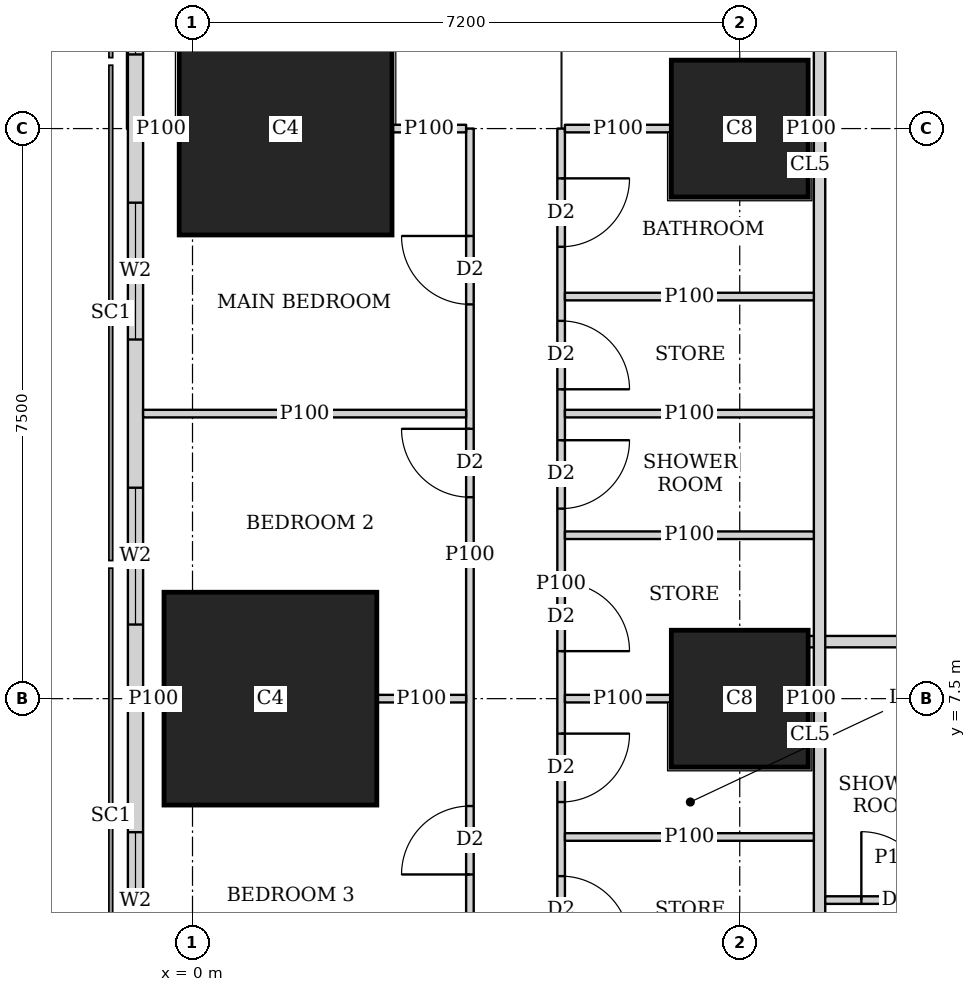
"""IFC4 building model, lengths in metres.
Left out: names, types, materials, properties, quantities, classifications, styles, units other than length and angle.
Written with IfcOpenShell. Run it as: python <this file> out.ifc"""

import sys

from ifc_helpers import new_model, si_unit, direction, frame, frame_2d, origin, origin_2d, place, context, subcontext, project, spatial, rectangle, extrude, element, fill, save


model = new_model("IFC4")
c1 = context("Model", 3, precision=1e-05, world=origin(), true_north=direction((0.0, 1.0)))
c2 = subcontext(c1, "Body", "Model", "MODEL_VIEW")
j1 = project(units=[si_unit("LENGTHUNIT", "METRE"), si_unit("PLANEANGLEUNIT", "RADIAN")], contexts=[c1])
p1 = place(None, origin())
s1 = spatial("IfcSite", under=j1, at=p1, CompositionType="ELEMENT")
p2 = place(p1, origin())
s2 = spatial("IfcBuilding", under=s1, at=p2, CompositionType="ELEMENT")
p3 = place(p2, frame((0.0, 0.0, 31.25)))
s3 = spatial("IfcBuildingStorey", under=s2, at=p3, CompositionType="ELEMENT", Elevation=31.25)
p4 = place(p3, frame((1.025, 7.5, 0.0), z_axis=(0.0, 0.0, 1.0), x_axis=(1.0, 0.0, 0.0)))
e1 = element("IfcColumn", 1, at=p4, inside=s3, PredefinedType="COLUMN", context=c2, shape_type="SweptSolid", body=[
    extrude(rectangle(XDim=2.8, YDim=2.8, at=origin_2d()), origin(), (0.0, 0.0, 1.0), 3.75),
])
p5 = place(p3, frame((7.2, 7.5, 0.0), z_axis=(0.0, 0.0, 1.0), x_axis=(1.0, 0.0, 0.0)))
e2 = element("IfcColumn", 2, at=p5, inside=s3, PredefinedType="COLUMN", context=c2, shape_type="SweptSolid", body=[
    extrude(rectangle(XDim=1.8, YDim=1.8, at=origin_2d()), origin(), (0.0, 0.0, 1.0), 3.75),
])
p6 = place(p3, frame((1.225, 15.0, 0.0), z_axis=(0.0, 0.0, 1.0), x_axis=(1.0, 0.0, 0.0)))
e3 = element("IfcColumn", 3, at=p6, inside=s3, PredefinedType="COLUMN", context=c2, shape_type="SweptSolid", body=[
    extrude(rectangle(XDim=2.8, YDim=2.8, at=origin_2d()), origin(), (0.0, 0.0, 1.0), 3.75),
])
p7 = place(p3, frame((7.2, 15.0, 0.0), z_axis=(0.0, 0.0, 1.0), x_axis=(1.0, 0.0, 0.0)))
e4 = element("IfcColumn", 4, at=p7, inside=s3, PredefinedType="COLUMN", context=c2, shape_type="SweptSolid", body=[
    extrude(rectangle(XDim=1.8, YDim=1.8, at=origin_2d()), origin(), (0.0, 0.0, 1.0), 3.75),
])
p8 = place(p3, frame((-0.75, 42.837, 0.0), z_axis=(0.0, 0.0, 1.0), x_axis=(0.0, -1.0, 0.0)))
e5 = element("IfcWall", 5, at=p8, inside=s3, PredefinedType="SOLIDWALL", context=c2, shape_type="SweptSolid", body=[
    extrude(rectangle(XDim=40.674, YDim=0.2, at=frame_2d((20.337, 0.0))), origin(), (0.0, 0.0, 1.0), 3.5),
])
p9 = place(p8, frame((1.78, 0.0, 0.9)))
e6 = element("IfcOpeningElement", 6, at=p9, cuts=e5, PredefinedType="OPENING", context=c2, shape_type="SweptSolid", body=[
    extrude(rectangle(XDim=1.8, YDim=1.5, at=frame_2d((0.9, 0.75))), frame((0.0, 0.11, 0.0), z_axis=(0.0, -1.0, 0.0), x_axis=(1.0, 0.0, 0.0)), (0.0, 0.0, 1.0), 0.22),
])
p10 = place(p8, frame((6.312, 0.0, 0.9)))
e7 = element("IfcOpeningElement", 7, at=p10, cuts=e5, PredefinedType="OPENING", context=c2, shape_type="SweptSolid", body=[
    extrude(rectangle(XDim=1.8, YDim=1.5, at=frame_2d((0.9, 0.75))), frame((0.0, 0.11, 0.0), z_axis=(0.0, -1.0, 0.0), x_axis=(1.0, 0.0, 0.0)), (0.0, 0.0, 1.0), 0.22),
])
p11 = place(p8, frame((10.062, 0.0, 0.9)))
e8 = element("IfcOpeningElement", 8, at=p11, cuts=e5, PredefinedType="OPENING", context=c2, shape_type="SweptSolid", body=[
    extrude(rectangle(XDim=1.8, YDim=1.5, at=frame_2d((0.9, 0.75))), frame((0.0, 0.11, 0.0), z_axis=(0.0, -1.0, 0.0), x_axis=(1.0, 0.0, 0.0)), (0.0, 0.0, 1.0), 0.22),
])
p12 = place(p8, frame((13.812, 0.0, 0.9)))
e9 = element("IfcOpeningElement", 9, at=p12, cuts=e5, PredefinedType="OPENING", context=c2, shape_type="SweptSolid", body=[
    extrude(rectangle(XDim=1.8, YDim=1.5, at=frame_2d((0.9, 0.75))), frame((0.0, 0.11, 0.0), z_axis=(0.0, -1.0, 0.0), x_axis=(1.0, 0.0, 0.0)), (0.0, 0.0, 1.0), 0.22),
])
p13 = place(p8, frame((17.562, 0.0, 0.9)))
e10 = element("IfcOpeningElement", 10, at=p13, cuts=e5, PredefinedType="OPENING", context=c2, shape_type="SweptSolid", body=[
    extrude(rectangle(XDim=1.8, YDim=1.5, at=frame_2d((0.9, 0.75))), frame((0.0, 0.11, 0.0), z_axis=(0.0, -1.0, 0.0), x_axis=(1.0, 0.0, 0.0)), (0.0, 0.0, 1.0), 0.22),
])
p14 = place(p8, frame((21.312, 0.0, 0.9)))
e11 = element("IfcOpeningElement", 11, at=p14, cuts=e5, PredefinedType="OPENING", context=c2, shape_type="SweptSolid", body=[
    extrude(rectangle(XDim=1.8, YDim=1.5, at=frame_2d((0.9, 0.75))), frame((0.0, 0.11, 0.0), z_axis=(0.0, -1.0, 0.0), x_axis=(1.0, 0.0, 0.0)), (0.0, 0.0, 1.0), 0.22),
])
p15 = place(p8, frame((25.062, 0.0, 0.9)))
e12 = element("IfcOpeningElement", 12, at=p15, cuts=e5, PredefinedType="OPENING", context=c2, shape_type="SweptSolid", body=[
    extrude(rectangle(XDim=1.8, YDim=1.5, at=frame_2d((0.9, 0.75))), frame((0.0, 0.11, 0.0), z_axis=(0.0, -1.0, 0.0), x_axis=(1.0, 0.0, 0.0)), (0.0, 0.0, 1.0), 0.22),
])
p16 = place(p8, frame((28.812, 0.0, 0.9)))
e13 = element("IfcOpeningElement", 13, at=p16, cuts=e5, PredefinedType="OPENING", context=c2, shape_type="SweptSolid", body=[
    extrude(rectangle(XDim=1.8, YDim=1.5, at=frame_2d((0.9, 0.75))), frame((0.0, 0.11, 0.0), z_axis=(0.0, -1.0, 0.0), x_axis=(1.0, 0.0, 0.0)), (0.0, 0.0, 1.0), 0.22),
])
p17 = place(p8, frame((32.562, 0.0, 0.9)))
e14 = element("IfcOpeningElement", 14, at=p17, cuts=e5, PredefinedType="OPENING", context=c2, shape_type="SweptSolid", body=[
    extrude(rectangle(XDim=1.8, YDim=1.5, at=frame_2d((0.9, 0.75))), frame((0.0, 0.11, 0.0), z_axis=(0.0, -1.0, 0.0), x_axis=(1.0, 0.0, 0.0)), (0.0, 0.0, 1.0), 0.22),
])
p18 = place(p8, frame((37.094, 0.0, 0.9)))
e15 = element("IfcOpeningElement", 15, at=p18, cuts=e5, PredefinedType="OPENING", context=c2, shape_type="SweptSolid", body=[
    extrude(rectangle(XDim=1.8, YDim=1.5, at=frame_2d((0.9, 0.75))), frame((0.0, 0.11, 0.0), z_axis=(0.0, -1.0, 0.0), x_axis=(1.0, 0.0, 0.0)), (0.0, 0.0, 1.0), 0.22),
])
p19 = place(p3, frame((8.25, 2.426, 0.0), z_axis=(0.0, 0.0, 1.0), x_axis=(0.0, 1.0, 0.0)))
e16 = element("IfcWall", 16, at=p19, inside=s3, PredefinedType="SOLIDWALL", context=c2, shape_type="SweptSolid", body=[
    extrude(rectangle(XDim=40.173, YDim=0.15, at=frame_2d((20.086, 0.0))), origin(), (0.0, 0.0, 1.0), 3.5),
])
p20 = place(p19, frame((14.161, 0.0, 0.0)))
e17 = element("IfcOpeningElement", 17, at=p20, cuts=e16, PredefinedType="OPENING", context=c2, shape_type="SweptSolid", body=[
    extrude(rectangle(XDim=1.0, YDim=2.1, at=frame_2d((0.5, 1.05))), frame((0.0, 0.085, 0.0), z_axis=(0.0, -1.0, 0.0), x_axis=(1.0, 0.0, 0.0)), (0.0, 0.0, 1.0), 0.17),
])
p21 = place(p19, frame((17.487, 0.0, 0.0)))
e18 = element("IfcOpeningElement", 18, at=p21, cuts=e16, PredefinedType="OPENING", context=c2, shape_type="SweptSolid", body=[
    extrude(rectangle(XDim=1.0, YDim=2.1, at=frame_2d((0.5, 1.05))), frame((0.0, 0.085, 0.0), z_axis=(0.0, -1.0, 0.0), x_axis=(1.0, 0.0, 0.0)), (0.0, 0.0, 1.0), 0.17),
])
p22 = place(p19, frame((29.161, 0.0, 0.0)))
e19 = element("IfcOpeningElement", 19, at=p22, cuts=e16, PredefinedType="OPENING", context=c2, shape_type="SweptSolid", body=[
    extrude(rectangle(XDim=1.0, YDim=2.1, at=frame_2d((0.5, 1.05))), frame((0.0, 0.085, 0.0), z_axis=(0.0, -1.0, 0.0), x_axis=(1.0, 0.0, 0.0)), (0.0, 0.0, 1.0), 0.17),
])
p23 = place(p3, frame((13.499, 8.25, 0.0), z_axis=(0.0, 0.0, 1.0), x_axis=(-1.0, 0.0, 0.0)))
e20 = element("IfcWall", 20, at=p23, inside=s3, PredefinedType="SOLIDWALL", context=c2, shape_type="SweptSolid", body=[
    extrude(rectangle(XDim=5.399, YDim=0.15, at=frame_2d((2.699, 0.0))), origin(), (0.0, 0.0, 1.0), 3.5),
])
p24 = place(p23, frame((0.66, 0.0, 0.0)))
e21 = element("IfcOpeningElement", 21, at=p24, cuts=e20, PredefinedType="OPENING", context=c2, shape_type="SweptSolid", body=[
    extrude(rectangle(XDim=1.0, YDim=2.1, at=frame_2d((0.5, 1.05))), frame((0.0, 0.085, 0.0), z_axis=(0.0, -1.0, 0.0), x_axis=(1.0, 0.0, 0.0)), (0.0, 0.0, 1.0), 0.17),
])
p25 = place(p3, frame((3.65, 3.787, 0.0), z_axis=(0.0, 0.0, 1.0), x_axis=(0.0, 1.0, 0.0)))
e22 = element("IfcWall", 22, at=p25, inside=s3, PredefinedType="PARTITIONING", context=c2, shape_type="SweptSolid", body=[
    extrude(rectangle(XDim=11.213, YDim=0.1, at=frame_2d((5.606, 0.0))), origin(), (0.0, 0.0, 1.0), 3.5),
])
p26 = place(p25, frame((8.9, 0.0, 0.0)))
e23 = element("IfcOpeningElement", 23, at=p26, cuts=e22, PredefinedType="OPENING", context=c2, shape_type="SweptSolid", body=[
    extrude(rectangle(XDim=0.9, YDim=2.1, at=frame_2d((0.45, 1.05))), frame((0.0, 0.06, 0.0), z_axis=(0.0, -1.0, 0.0), x_axis=(1.0, 0.0, 0.0)), (0.0, 0.0, 1.0), 0.12),
])
p27 = place(p25, frame((6.363, 0.0, 0.0)))
e24 = element("IfcOpeningElement", 24, at=p27, cuts=e22, PredefinedType="OPENING", context=c2, shape_type="SweptSolid", body=[
    extrude(rectangle(XDim=0.9, YDim=2.1, at=frame_2d((0.45, 1.05))), frame((0.0, 0.06, 0.0), z_axis=(0.0, -1.0, 0.0), x_axis=(1.0, 0.0, 0.0)), (0.0, 0.0, 1.0), 0.12),
])
p28 = place(p25, frame((1.4, 0.0, 0.0)))
e25 = element("IfcOpeningElement", 25, at=p28, cuts=e22, PredefinedType="OPENING", context=c2, shape_type="SweptSolid", body=[
    extrude(rectangle(XDim=0.9, YDim=2.1, at=frame_2d((0.45, 1.05))), frame((0.0, 0.06, 0.0), z_axis=(0.0, -1.0, 0.0), x_axis=(1.0, 0.0, 0.0)), (0.0, 0.0, 1.0), 0.12),
])
p29 = place(p3, frame((4.85, 3.018, 0.0), z_axis=(0.0, 0.0, 1.0), x_axis=(0.0, 1.0, 0.0)))
e26 = element("IfcWall", 26, at=p29, inside=s3, PredefinedType="PARTITIONING", context=c2, shape_type="SweptSolid", body=[
    extrude(rectangle(XDim=11.982, YDim=0.1, at=frame_2d((5.991, 0.0))), origin(), (0.0, 0.0, 1.0), 3.5),
])
p30 = place(p29, frame((10.427, 0.0, 0.0)))
e27 = element("IfcOpeningElement", 27, at=p30, cuts=e26, PredefinedType="OPENING", context=c2, shape_type="SweptSolid", body=[
    extrude(rectangle(XDim=0.9, YDim=2.1, at=frame_2d((0.45, 1.05))), frame((0.0, 0.06, 0.0), z_axis=(0.0, -1.0, 0.0), x_axis=(1.0, 0.0, 0.0)), (0.0, 0.0, 1.0), 0.12),
])
p31 = place(p29, frame((6.982, 0.0, 0.0)))
e28 = element("IfcOpeningElement", 28, at=p31, cuts=e26, PredefinedType="OPENING", context=c2, shape_type="SweptSolid", body=[
    extrude(rectangle(XDim=0.9, YDim=2.1, at=frame_2d((0.45, 1.05))), frame((0.0, 0.06, 0.0), z_axis=(0.0, -1.0, 0.0), x_axis=(1.0, 0.0, 0.0)), (0.0, 0.0, 1.0), 0.12),
])
p32 = place(p29, frame((3.122, 0.0, 0.0)))
e29 = element("IfcOpeningElement", 29, at=p32, cuts=e26, PredefinedType="OPENING", context=c2, shape_type="SweptSolid", body=[
    extrude(rectangle(XDim=0.9, YDim=2.1, at=frame_2d((0.45, 1.05))), frame((0.0, 0.06, 0.0), z_axis=(0.0, -1.0, 0.0), x_axis=(1.0, 0.0, 0.0)), (0.0, 0.0, 1.0), 0.12),
])
p33 = place(p29, frame((8.552, 0.0, 0.0)))
e30 = element("IfcOpeningElement", 30, at=p33, cuts=e26, PredefinedType="OPENING", context=c2, shape_type="SweptSolid", body=[
    extrude(rectangle(XDim=0.9, YDim=2.1, at=frame_2d((0.45, 1.05))), frame((0.0, 0.06, 0.0), z_axis=(0.0, -1.0, 0.0), x_axis=(1.0, 0.0, 0.0)), (0.0, 0.0, 1.0), 0.12),
])
p34 = place(p29, frame((5.107, 0.0, 0.0)))
e31 = element("IfcOpeningElement", 31, at=p34, cuts=e26, PredefinedType="OPENING", context=c2, shape_type="SweptSolid", body=[
    extrude(rectangle(XDim=0.9, YDim=2.1, at=frame_2d((0.45, 1.05))), frame((0.0, 0.06, 0.0), z_axis=(0.0, -1.0, 0.0), x_axis=(1.0, 0.0, 0.0)), (0.0, 0.0, 1.0), 0.12),
])
p35 = place(p29, frame((1.247, 0.0, 0.0)))
e32 = element("IfcOpeningElement", 32, at=p35, cuts=e26, PredefinedType="OPENING", context=c2, shape_type="SweptSolid", body=[
    extrude(rectangle(XDim=0.9, YDim=2.1, at=frame_2d((0.45, 1.05))), frame((0.0, 0.06, 0.0), z_axis=(0.0, -1.0, 0.0), x_axis=(1.0, 0.0, 0.0)), (0.0, 0.0, 1.0), 0.12),
])
p36 = place(p3, frame((-0.65, 7.5, 0.0), z_axis=(0.0, 0.0, 1.0), x_axis=(1.0, 0.0, 0.0)))
e33 = element("IfcWall", 33, at=p36, inside=s3, PredefinedType="PARTITIONING", context=c2, shape_type="SweptSolid", body=[
    extrude(rectangle(XDim=0.274, YDim=0.1, at=frame_2d((0.137, 0.0))), origin(), (0.0, 0.0, 1.0), 3.5),
])
p37 = place(p3, frame((2.426, 7.5, 0.0), z_axis=(0.0, 0.0, 1.0), x_axis=(1.0, 0.0, 0.0)))
e34 = element("IfcWall", 34, at=p37, inside=s3, PredefinedType="PARTITIONING", context=c2, shape_type="SweptSolid", body=[
    extrude(rectangle(XDim=1.174, YDim=0.1, at=frame_2d((0.587, 0.0))), origin(), (0.0, 0.0, 1.0), 2.05),
])
p38 = place(p3, frame((-0.65, 11.25, 0.0), z_axis=(0.0, 0.0, 1.0), x_axis=(1.0, 0.0, 0.0)))
e35 = element("IfcWall", 35, at=p38, inside=s3, PredefinedType="PARTITIONING", context=c2, shape_type="SweptSolid", body=[
    extrude(rectangle(XDim=4.25, YDim=0.1, at=frame_2d((2.125, 0.0))), origin(), (0.0, 0.0, 1.0), 2.05),
])
p39 = place(p3, frame((-0.65, 15.0, 0.0), z_axis=(0.0, 0.0, 1.0), x_axis=(1.0, 0.0, 0.0)))
e36 = element("IfcWall", 36, at=p39, inside=s3, PredefinedType="PARTITIONING", context=c2, shape_type="SweptSolid", body=[
    extrude(rectangle(XDim=0.474, YDim=0.1, at=frame_2d((0.237, 0.0))), origin(), (0.0, 0.0, 1.0), 3.5),
])
p40 = place(p3, frame((2.626, 15.0, 0.0), z_axis=(0.0, 0.0, 1.0), x_axis=(1.0, 0.0, 0.0)))
e37 = element("IfcWall", 37, at=p40, inside=s3, PredefinedType="PARTITIONING", context=c2, shape_type="SweptSolid", body=[
    extrude(rectangle(XDim=0.974, YDim=0.1, at=frame_2d((0.487, 0.0))), origin(), (0.0, 0.0, 1.0), 3.5),
])
p41 = place(p3, frame((4.9, 7.5, 0.0), z_axis=(0.0, 0.0, 1.0), x_axis=(1.0, 0.0, 0.0)))
e38 = element("IfcWall", 38, at=p41, inside=s3, PredefinedType="PARTITIONING", context=c2, shape_type="SweptSolid", body=[
    extrude(rectangle(XDim=1.399, YDim=0.1, at=frame_2d((0.7, 0.0))), origin(), (0.0, 0.0, 1.0), 3.5),
])
p42 = place(p3, frame((8.101, 7.5, 0.0), z_axis=(0.0, 0.0, 1.0), x_axis=(1.0, 0.0, 0.0)))
e39 = element("IfcWall", 39, at=p42, inside=s3, PredefinedType="PARTITIONING", context=c2, shape_type="SweptSolid", body=[
    extrude(rectangle(XDim=0.074, YDim=0.1, at=frame_2d((0.037, 0.0))), origin(), (0.0, 0.0, 1.0), 3.5),
])
p43 = place(p3, frame((4.9, 11.25, 0.0), z_axis=(0.0, 0.0, 1.0), x_axis=(1.0, 0.0, 0.0)))
e40 = element("IfcWall", 40, at=p43, inside=s3, PredefinedType="PARTITIONING", context=c2, shape_type="SweptSolid", body=[
    extrude(rectangle(XDim=3.275, YDim=0.1, at=frame_2d((1.638, 0.0))), origin(), (0.0, 0.0, 1.0), 3.5),
])
p44 = place(p3, frame((4.9, 15.0, 0.0), z_axis=(0.0, 0.0, 1.0), x_axis=(1.0, 0.0, 0.0)))
e41 = element("IfcWall", 41, at=p44, inside=s3, PredefinedType="PARTITIONING", context=c2, shape_type="SweptSolid", body=[
    extrude(rectangle(XDim=1.399, YDim=0.1, at=frame_2d((0.7, 0.0))), origin(), (0.0, 0.0, 1.0), 3.5),
])
p45 = place(p3, frame((8.101, 15.0, 0.0), z_axis=(0.0, 0.0, 1.0), x_axis=(1.0, 0.0, 0.0)))
e42 = element("IfcWall", 42, at=p45, inside=s3, PredefinedType="PARTITIONING", context=c2, shape_type="SweptSolid", body=[
    extrude(rectangle(XDim=0.074, YDim=0.1, at=frame_2d((0.037, 0.0))), origin(), (0.0, 0.0, 1.0), 3.5),
])
for number, where, z_axis, x_axis in (
    (43, (4.9, 12.79, 0.0), (0.0, 0.0, 1.0), (1.0, 0.0, 0.0)),
    (44, (4.9, 9.65, 0.0), (0.0, 0.0, 1.0), (1.0, 0.0, 0.0)),
    (45, (4.9, 5.68, 0.0), (0.0, 0.0, 1.0), (1.0, 0.0, 0.0)),
):
    element("IfcWall", number, at=place(p3, frame(where, z_axis=z_axis, x_axis=x_axis)), inside=s3, PredefinedType="PARTITIONING", context=c2, shape_type="SweptSolid", body=[
        extrude(rectangle(XDim=3.275, YDim=0.1, at=frame_2d((1.638, 0.0))), origin(), (0.0, 0.0, 1.0), 3.5),
    ])
p46 = place(p3, frame((10.279, 4.85, 0.0), z_axis=(0.0, 0.0, 1.0), x_axis=(-1.0, 0.0, 0.0)))
e46 = element("IfcWall", 46, at=p46, inside=s3, PredefinedType="PARTITIONING", context=c2, shape_type="SweptSolid", body=[
    extrude(rectangle(XDim=1.954, YDim=0.1, at=frame_2d((0.977, 0.0))), origin(), (0.0, 0.0, 1.0), 3.5),
])
p47 = place(p46, frame((0.579, 0.0, 0.0)))
e47 = element("IfcOpeningElement", 47, at=p47, cuts=e46, PredefinedType="OPENING", context=c2, shape_type="SweptSolid", body=[
    extrude(rectangle(XDim=0.9, YDim=2.1, at=frame_2d((0.45, 1.05))), frame((0.0, 0.06, 0.0), z_axis=(0.0, -1.0, 0.0), x_axis=(1.0, 0.0, 0.0)), (0.0, 0.0, 1.0), 0.12),
])
p48 = place(p15, origin())
e48 = element("IfcWindow", 48, at=p48, inside=s3, PartitioningType="SINGLE_PANEL", PredefinedType="WINDOW", context=c2, shape_type="SweptSolid", body=[
    extrude(rectangle(XDim=1.8, YDim=1.5, at=frame_2d((0.9, 0.75))), frame((0.0, 0.03, 0.0), z_axis=(0.0, -1.0, 0.0), x_axis=(1.0, 0.0, 0.0)), (0.0, 0.0, 1.0), 0.06),
])
fill(e12, e48)
p49 = place(p16, origin())
e49 = element("IfcWindow", 49, at=p49, inside=s3, PartitioningType="SINGLE_PANEL", PredefinedType="WINDOW", context=c2, shape_type="SweptSolid", body=[
    extrude(rectangle(XDim=1.8, YDim=1.5, at=frame_2d((0.9, 0.75))), frame((0.0, 0.03, 0.0), z_axis=(0.0, -1.0, 0.0), x_axis=(1.0, 0.0, 0.0)), (0.0, 0.0, 1.0), 0.06),
])
fill(e13, e49)
p50 = place(p17, origin())
e50 = element("IfcWindow", 50, at=p50, inside=s3, PartitioningType="SINGLE_PANEL", PredefinedType="WINDOW", context=c2, shape_type="SweptSolid", body=[
    extrude(rectangle(XDim=1.8, YDim=1.5, at=frame_2d((0.9, 0.75))), frame((0.0, 0.03, 0.0), z_axis=(0.0, -1.0, 0.0), x_axis=(1.0, 0.0, 0.0)), (0.0, 0.0, 1.0), 0.06),
])
fill(e14, e50)
p51 = place(p18, origin())
e51 = element("IfcWindow", 51, at=p51, inside=s3, PartitioningType="SINGLE_PANEL", PredefinedType="WINDOW", context=c2, shape_type="SweptSolid", body=[
    extrude(rectangle(XDim=1.8, YDim=1.5, at=frame_2d((0.9, 0.75))), frame((0.0, 0.03, 0.0), z_axis=(0.0, -1.0, 0.0), x_axis=(1.0, 0.0, 0.0)), (0.0, 0.0, 1.0), 0.06),
])
fill(e15, e51)
p52 = place(p26, origin())
e52 = element("IfcDoor", 52, at=p52, inside=s3, OperationType="SINGLE_SWING_RIGHT", PredefinedType="DOOR", context=c2, shape_type="SweptSolid", body=[
    extrude(rectangle(XDim=0.9, YDim=2.1, at=frame_2d((0.45, 1.05))), frame((0.0, 0.025, 0.0), z_axis=(0.0, -1.0, 0.0), x_axis=(1.0, 0.0, 0.0)), (0.0, 0.0, 1.0), 0.05),
])
fill(e23, e52)
p53 = place(p27, origin())
e53 = element("IfcDoor", 53, at=p53, inside=s3, OperationType="SINGLE_SWING_RIGHT", PredefinedType="DOOR", context=c2, shape_type="SweptSolid", body=[
    extrude(rectangle(XDim=0.9, YDim=2.1, at=frame_2d((0.45, 1.05))), frame((0.0, 0.025, 0.0), z_axis=(0.0, -1.0, 0.0), x_axis=(1.0, 0.0, 0.0)), (0.0, 0.0, 1.0), 0.05),
])
fill(e24, e53)
p54 = place(p28, origin())
e54 = element("IfcDoor", 54, at=p54, inside=s3, OperationType="SINGLE_SWING_LEFT", PredefinedType="DOOR", context=c2, shape_type="SweptSolid", body=[
    extrude(rectangle(XDim=0.9, YDim=2.1, at=frame_2d((0.45, 1.05))), frame((0.0, 0.025, 0.0), z_axis=(0.0, -1.0, 0.0), x_axis=(1.0, 0.0, 0.0)), (0.0, 0.0, 1.0), 0.05),
])
fill(e25, e54)
p55 = place(p30, origin())
e55 = element("IfcDoor", 55, at=p55, inside=s3, OperationType="SINGLE_SWING_LEFT", PredefinedType="DOOR", context=c2, shape_type="SweptSolid", body=[
    extrude(rectangle(XDim=0.9, YDim=2.1, at=frame_2d((0.45, 1.05))), frame((0.0, 0.025, 0.0), z_axis=(0.0, -1.0, 0.0), x_axis=(1.0, 0.0, 0.0)), (0.0, 0.0, 1.0), 0.05),
])
fill(e27, e55)
p56 = place(p31, origin())
e56 = element("IfcDoor", 56, at=p56, inside=s3, OperationType="SINGLE_SWING_LEFT", PredefinedType="DOOR", context=c2, shape_type="SweptSolid", body=[
    extrude(rectangle(XDim=0.9, YDim=2.1, at=frame_2d((0.45, 1.05))), frame((0.0, 0.025, 0.0), z_axis=(0.0, -1.0, 0.0), x_axis=(1.0, 0.0, 0.0)), (0.0, 0.0, 1.0), 0.05),
])
fill(e28, e56)
p57 = place(p32, origin())
e57 = element("IfcDoor", 57, at=p57, inside=s3, OperationType="SINGLE_SWING_LEFT", PredefinedType="DOOR", context=c2, shape_type="SweptSolid", body=[
    extrude(rectangle(XDim=0.9, YDim=2.1, at=frame_2d((0.45, 1.05))), frame((0.0, 0.025, 0.0), z_axis=(0.0, -1.0, 0.0), x_axis=(1.0, 0.0, 0.0)), (0.0, 0.0, 1.0), 0.05),
])
fill(e29, e57)
p58 = place(p33, origin())
e58 = element("IfcDoor", 58, at=p58, inside=s3, OperationType="SINGLE_SWING_RIGHT", PredefinedType="DOOR", context=c2, shape_type="SweptSolid", body=[
    extrude(rectangle(XDim=0.9, YDim=2.1, at=frame_2d((0.45, 1.05))), frame((0.0, 0.025, 0.0), z_axis=(0.0, -1.0, 0.0), x_axis=(1.0, 0.0, 0.0)), (0.0, 0.0, 1.0), 0.05),
])
fill(e30, e58)
p59 = place(p34, origin())
e59 = element("IfcDoor", 59, at=p59, inside=s3, OperationType="SINGLE_SWING_RIGHT", PredefinedType="DOOR", context=c2, shape_type="SweptSolid", body=[
    extrude(rectangle(XDim=0.9, YDim=2.1, at=frame_2d((0.45, 1.05))), frame((0.0, 0.025, 0.0), z_axis=(0.0, -1.0, 0.0), x_axis=(1.0, 0.0, 0.0)), (0.0, 0.0, 1.0), 0.05),
])
fill(e31, e59)
p60 = place(p35, origin())
e60 = element("IfcDoor", 60, at=p60, inside=s3, OperationType="SINGLE_SWING_RIGHT", PredefinedType="DOOR", context=c2, shape_type="SweptSolid", body=[
    extrude(rectangle(XDim=0.9, YDim=2.1, at=frame_2d((0.45, 1.05))), frame((0.0, 0.025, 0.0), z_axis=(0.0, -1.0, 0.0), x_axis=(1.0, 0.0, 0.0)), (0.0, 0.0, 1.0), 0.05),
])
fill(e32, e60)
p61 = place(p47, origin())
e61 = element("IfcDoor", 61, at=p61, inside=s3, OperationType="SINGLE_SWING_LEFT", PredefinedType="DOOR", context=c2, shape_type="SweptSolid", body=[
    extrude(rectangle(XDim=0.9, YDim=2.1, at=frame_2d((0.45, 1.05))), frame((0.0, 0.025, 0.0), z_axis=(0.0, -1.0, 0.0), x_axis=(1.0, 0.0, 0.0)), (0.0, 0.0, 1.0), 0.05),
])
fill(e47, e61)
save(model, sys.argv[1])
